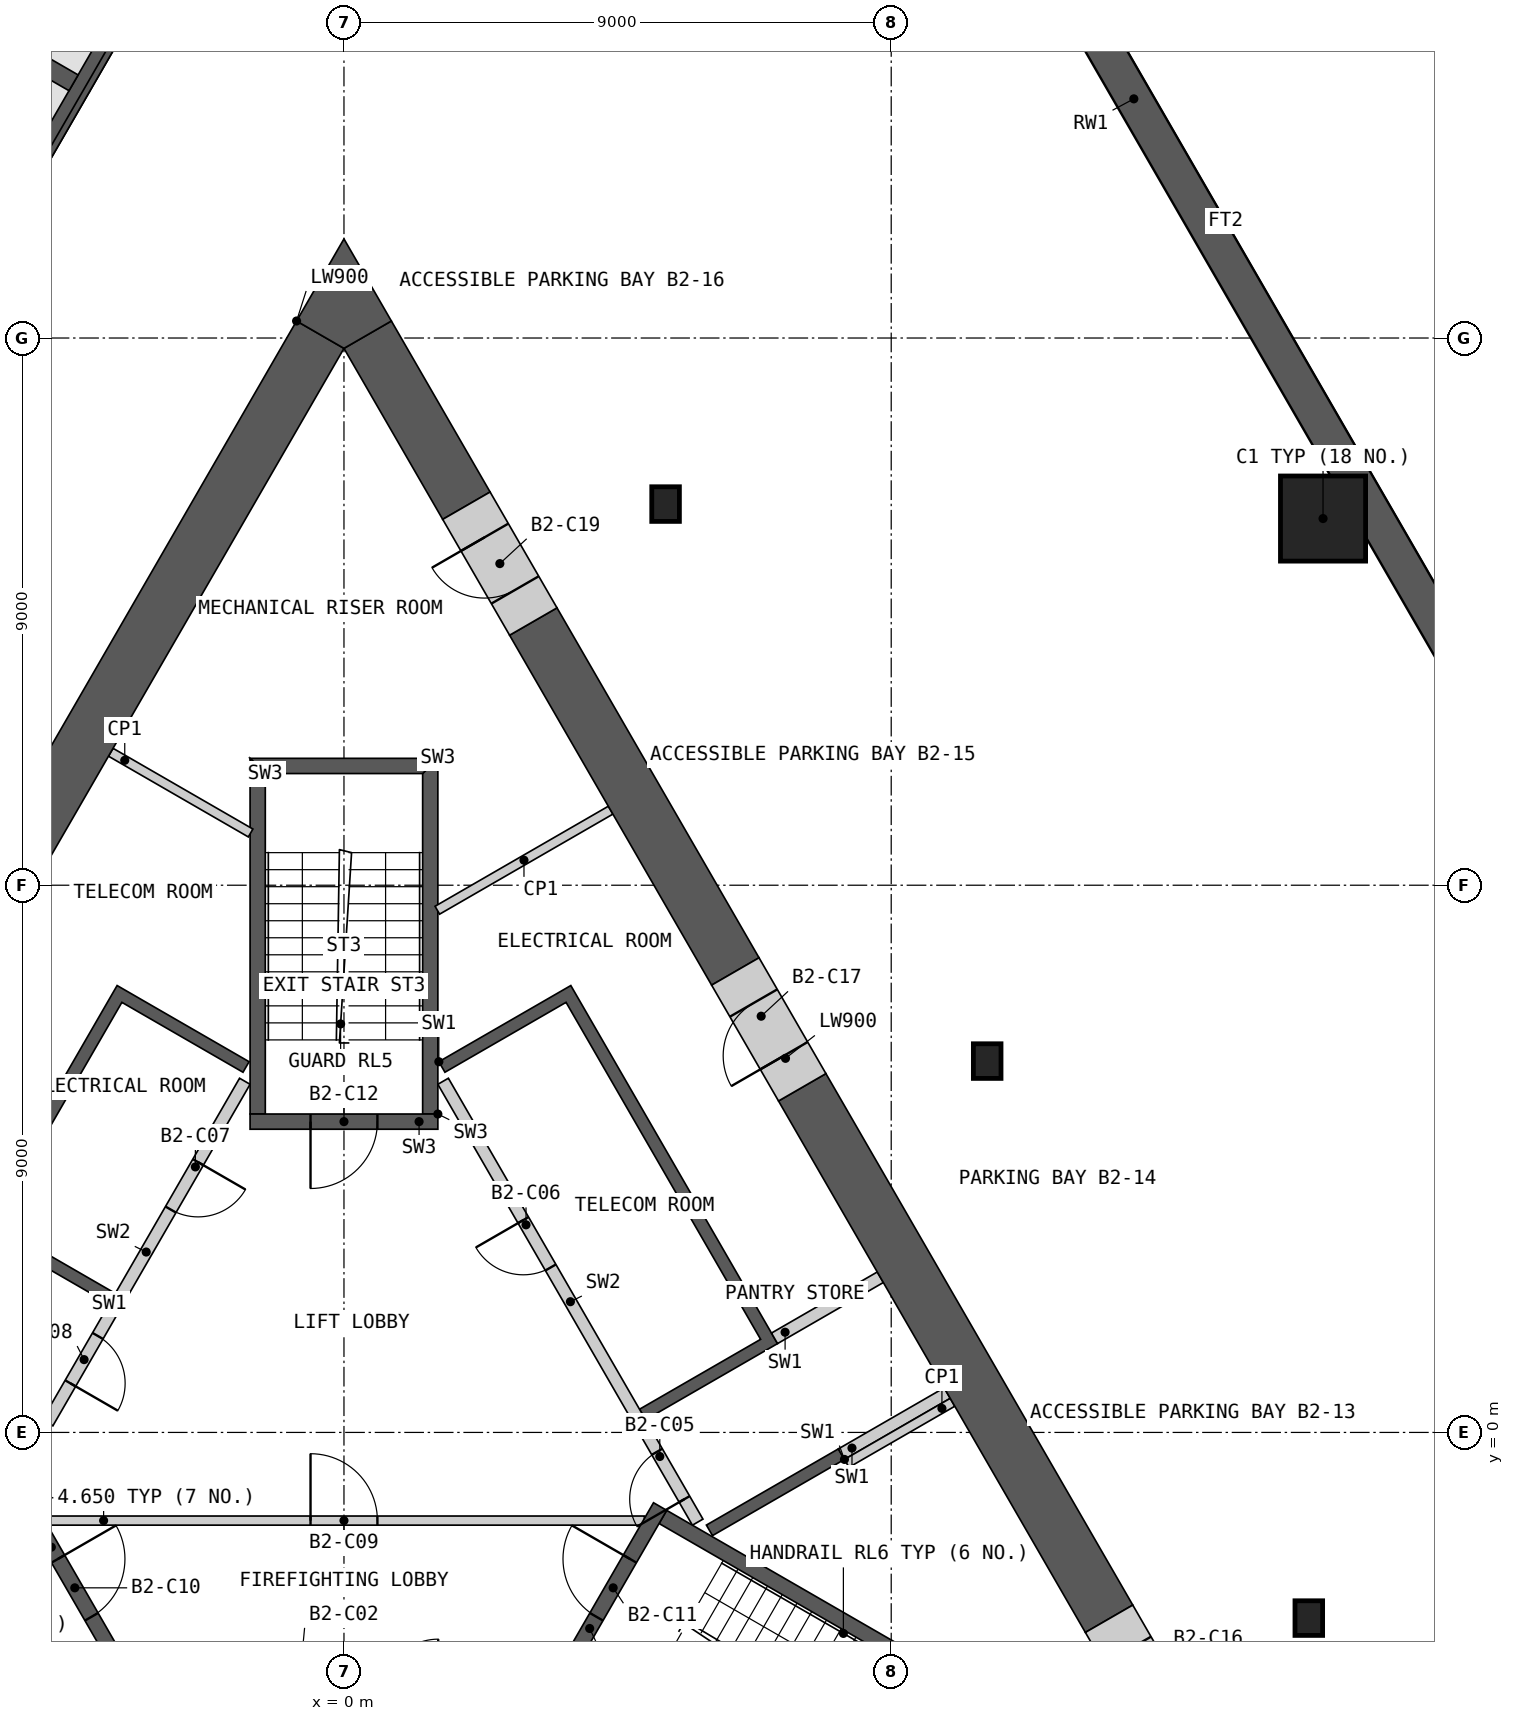
"""IFC4 building model, lengths in metres.
Left out: names, types, materials, properties, quantities, classifications, styles, units other than length and angle.
Written with IfcOpenShell. Run it as: python <this file> out.ifc"""

import sys

from ifc_helpers import new_model, si_unit, direction, frame, frame_2d, origin, origin_2d, place, context, subcontext, project, spatial, polyline, rectangle, hollow_rectangle, i_section, outline, extrude, element, fill, save


model = new_model("IFC4")
c1 = context("Model", 3, precision=1e-05, world=origin(), true_north=direction((0.0, 1.0)))
c2 = subcontext(c1, "Body", "Model", "MODEL_VIEW")
j1 = project(units=[si_unit("LENGTHUNIT", "METRE"), si_unit("PLANEANGLEUNIT", "RADIAN")], contexts=[c1])
p1 = place(None, origin())
s1 = spatial("IfcSite", under=j1, at=p1, CompositionType="ELEMENT")
p2 = place(p1, origin())
s2 = spatial("IfcBuilding", under=s1, at=p2, CompositionType="ELEMENT")
p3 = place(p2, frame((0.0, 0.0, -8.4)))
s3 = spatial("IfcBuildingStorey", under=s2, at=p3, CompositionType="ELEMENT", Elevation=-8.4)
p4 = place(p3, frame((31.74, -10.542, 0.0), z_axis=(0.0, 0.0, 1.0), x_axis=(-0.500000005698, 0.866025400495, 0.0)))
e1 = element("IfcWall", 1, at=p4, inside=s3, PredefinedType="SOLIDWALL", context=c2, shape_type="SweptSolid", body=[
    extrude(rectangle(XDim=50.0, YDim=0.6, at=frame_2d((25.0, 0.0))), origin(), (0.0, 0.0, 1.0), 3.75),
])
p5 = place(p3, frame((16.102, 15.031, 0.0), z_axis=(0.0, 0.0, 1.0), x_axis=(1.0, 0.0, 0.0)))
e2 = element("IfcColumn", 2, at=p5, inside=s3, PredefinedType="COLUMN", context=c2, shape_type="SweptSolid", body=[
    extrude(hollow_rectangle(XDim=1.4, YDim=1.4, WallThickness=0.1, at=origin_2d()), origin(), (0.0, 0.0, 1.0), 4.2),
])
for number, where, z_axis, x_axis in (
    (3, (15.868, -3.054, 0.0), (0.0, 0.0, 1.0), (1.0, 0.0, 0.0)),
    (4, (10.578, 6.107, 0.0), (0.0, 0.0, 1.0), (1.0, 0.0, 0.0)),
    (5, (5.289, 15.269, 0.0), (0.0, 0.0, 1.0), (1.0, 0.0, 0.0)),
):
    element("IfcColumn", number, at=place(p3, frame(where, z_axis=z_axis, x_axis=x_axis)), inside=s3, PredefinedType="COLUMN", context=c2, shape_type="SweptSolid", body=[
        extrude(i_section(OverallWidth=0.454, OverallDepth=0.57, WebThickness=0.078, FlangeThickness=0.125, at=origin_2d()), origin(), (0.0, 0.0, 1.0), 4.2),
    ])
p6 = place(p3, origin())
e6 = element("IfcWall", 6, at=p6, inside=s3, PredefinedType="SHEAR", context=c2, shape_type="SweptSolid", body=[
    extrude(outline(polyline([(1.561, 6.097), (3.731, 7.35), (7.131, 1.461), (4.96, 0.208), (4.861, 0.381), (6.852, 1.531), (3.652, 7.074), (1.66, 5.924), (1.561, 6.097)])), origin(), (0.0, 0.0, 1.0), 3.75),
])
p7 = place(p3, origin())
e7 = element("IfcWall", 7, at=p7, inside=s3, PredefinedType="SHEAR", context=c2, shape_type="SweptSolid", body=[
    extrude(outline(polyline([(8.231, -0.444), (6.061, -1.697), (5.96, -1.524), (8.131, -0.271), (8.231, -0.444)])), origin(), (0.0, 0.0, 1.0), 3.75),
])
p8 = place(p3, frame((5.817, -1.476, 0.0), z_axis=(0.0, 0.0, 1.0), x_axis=(-0.500002616675, 0.866023893041, 0.0)))
e8 = element("IfcWall", 8, at=p8, inside=s3, PredefinedType="SOLIDWALL", context=c2, shape_type="SweptSolid", body=[
    extrude(rectangle(XDim=8.373, YDim=0.2, at=frame_2d((4.187, 0.0))), origin(), (0.0, 0.0, 1.0), 3.75),
])
p9 = place(p8, frame((0.437, 0.0, 0.0)))
e9 = element("IfcOpeningElement", 9, at=p9, cuts=e8, PredefinedType="OPENING", context=c2, shape_type="SweptSolid", body=[
    extrude(rectangle(XDim=0.9, YDim=2.1, at=frame_2d((0.45, 1.05))), frame((0.0, 0.11, 0.0), z_axis=(0.0, -1.0, 0.0), x_axis=(1.0, 0.0, 0.0)), (0.0, 0.0, 1.0), 0.22),
])
p10 = place(p8, frame((4.837, 0.0, 0.0)))
e10 = element("IfcOpeningElement", 10, at=p10, cuts=e8, PredefinedType="OPENING", context=c2, shape_type="SweptSolid", body=[
    extrude(rectangle(XDim=0.9, YDim=2.1, at=frame_2d((0.45, 1.05))), frame((0.0, 0.11, 0.0), z_axis=(0.0, -1.0, 0.0), x_axis=(1.0, 0.0, 0.0)), (0.0, 0.0, 1.0), 0.22),
])
p11 = place(p3, frame((8.181, -0.357, 0.0), z_axis=(0.0, 0.0, 1.0), x_axis=(0.866035824272, 0.499981950752, 0.0)))
e11 = element("IfcWall", 11, at=p11, inside=s3, PredefinedType="SHEAR", context=c2, shape_type="SweptSolid", body=[
    extrude(rectangle(XDim=2.009, YDim=0.2, at=frame_2d((1.004, 0.0))), origin(), (0.0, 0.0, 1.0), 3.75),
])
p12 = place(p3, frame((7.081, 1.548, 0.0), z_axis=(0.0, 0.0, 1.0), x_axis=(0.865983199114, 0.50007309351, 0.0)))
e12 = element("IfcWall", 12, at=p12, inside=s3, PredefinedType="SHEAR", context=c2, shape_type="SweptSolid", body=[
    extrude(rectangle(XDim=2.009, YDim=0.2, at=frame_2d((1.004, 0.0))), origin(), (0.0, 0.0, 1.0), 3.75),
])
p13 = place(p3, origin())
e13 = element("IfcWall", 13, at=p13, inside=s3, PredefinedType="SHEAR", context=c2, shape_type="SweptSolid", body=[
    extrude(outline(polyline([(-3.861, 2.113), (-6.031, 3.366), (-3.731, 7.35), (-1.561, 6.097), (-1.66, 5.924), (-3.652, 7.074), (-5.752, 3.437), (-3.76, 2.287), (-3.861, 2.113)])), origin(), (0.0, 0.0, 1.0), 3.75),
])
p14 = place(p3, frame((-1.631, 5.776, 0.0), z_axis=(0.0, 0.0, 1.0), x_axis=(-0.499992876559, -0.866029516466, 0.0)))
e14 = element("IfcWall", 14, at=p14, inside=s3, PredefinedType="SOLIDWALL", context=c2, shape_type="SweptSolid", body=[
    extrude(rectangle(XDim=6.486, YDim=0.2, at=frame_2d((3.243, 0.0))), origin(), (0.0, 0.0, 1.0), 3.75),
])
p15 = place(p14, frame((1.537, 0.0, 0.0)))
e15 = element("IfcOpeningElement", 15, at=p15, cuts=e14, PredefinedType="OPENING", context=c2, shape_type="SweptSolid", body=[
    extrude(rectangle(XDim=0.9, YDim=2.1, at=frame_2d((0.45, 1.05))), frame((0.0, 0.11, 0.0), z_axis=(0.0, -1.0, 0.0), x_axis=(1.0, 0.0, 0.0)), (0.0, 0.0, 1.0), 0.22),
])
p16 = place(p14, frame((4.837, 0.0, 0.0)))
e16 = element("IfcOpeningElement", 16, at=p16, cuts=e14, PredefinedType="OPENING", context=c2, shape_type="SweptSolid", body=[
    extrude(rectangle(XDim=0.9, YDim=2.1, at=frame_2d((0.45, 1.05))), frame((0.0, 0.11, 0.0), z_axis=(0.0, -1.0, 0.0), x_axis=(1.0, 0.0, 0.0)), (0.0, 0.0, 1.0), 0.22),
])
p17 = place(p3, frame((-4.941, -1.45, 0.0), z_axis=(0.0, 0.0, 1.0), x_axis=(1.0, 0.0, 0.0)))
e17 = element("IfcWall", 17, at=p17, inside=s3, PredefinedType="PARTITIONING", context=c2, shape_type="SweptSolid", body=[
    extrude(rectangle(XDim=9.882, YDim=0.15, at=frame_2d((4.941, 0.0))), origin(), (0.0, 0.0, 1.0), 3.75),
])
p18 = place(p17, frame((4.391, 0.0, 0.0)))
e18 = element("IfcOpeningElement", 18, at=p18, cuts=e17, PredefinedType="OPENING", context=c2, shape_type="SweptSolid", body=[
    extrude(rectangle(XDim=1.1, YDim=2.1, at=frame_2d((0.55, 1.05))), frame((0.0, 0.085, 0.0), z_axis=(0.0, -1.0, 0.0), x_axis=(1.0, 0.0, 0.0)), (0.0, 0.0, 1.0), 0.17),
])
p19 = place(p3, frame((-5.199, -1.219, 0.0), z_axis=(0.0, 0.0, 1.0), x_axis=(0.499982516597, -0.866035497597, 0.0)))
e19 = element("IfcWall", 19, at=p19, inside=s3, PredefinedType="SHEAR", context=c2, shape_type="SweptSolid", body=[
    extrude(rectangle(XDim=3.088, YDim=0.25, at=frame_2d((1.544, 0.0))), origin(), (0.0, 0.0, 1.0), 3.75),
])
p20 = place(p19, frame((0.994, 0.0, 0.0)))
e20 = element("IfcOpeningElement", 20, at=p20, cuts=e19, PredefinedType="OPENING", context=c2, shape_type="SweptSolid", body=[
    extrude(rectangle(XDim=1.1, YDim=2.1, at=frame_2d((0.55, 1.05))), frame((0.0, 0.135, 0.0), z_axis=(0.0, -1.0, 0.0), x_axis=(1.0, 0.0, 0.0)), (0.0, 0.0, 1.0), 0.27),
])
p21 = place(p3, origin())
e21 = element("IfcWall", 21, at=p21, inside=s3, PredefinedType="SHEAR", context=c2, shape_type="SweptSolid", body=[
    extrude(outline(polyline([(10.032, -4.298), (10.374, -4.206), (5.307, -1.281), (5.182, -1.498), (10.032, -4.298)])), origin(), (0.0, 0.0, 1.0), 3.75),
])
p22 = place(p3, frame((3.655, -3.893, 0.0), z_axis=(0.0, 0.0, 1.0), x_axis=(0.499982516597, 0.866035497597, 0.0)))
e22 = element("IfcWall", 22, at=p22, inside=s3, PredefinedType="SHEAR", context=c2, shape_type="SweptSolid", body=[
    extrude(rectangle(XDim=3.088, YDim=0.25, at=frame_2d((1.544, 0.0))), origin(), (0.0, 0.0, 1.0), 3.75),
])
p23 = place(p22, frame((0.994, 0.0, 0.0)))
e23 = element("IfcOpeningElement", 23, at=p23, cuts=e22, PredefinedType="OPENING", context=c2, shape_type="SweptSolid", body=[
    extrude(rectangle(XDim=1.1, YDim=2.1, at=frame_2d((0.55, 1.05))), frame((0.0, 0.135, 0.0), z_axis=(0.0, -1.0, 0.0), x_axis=(1.0, 0.0, 0.0)), (0.0, 0.0, 1.0), 0.27),
])
p24 = place(p3, origin())
e24 = element("IfcWall", 24, at=p24, inside=s3, PredefinedType="SHEAR", context=c2, shape_type="SweptSolid", body=[
    extrude(outline(polyline([(1.544, 5.237), (1.544, 11.087), (1.294, 10.837), (1.294, 5.237), (1.544, 5.237)])), origin(), (0.0, 0.0, 1.0), 3.75),
])
p25 = place(p3, origin())
e25 = element("IfcWall", 25, at=p25, inside=s3, PredefinedType="SHEAR", context=c2, shape_type="SweptSolid", body=[
    extrude(outline(polyline([(1.544, 11.087), (-1.544, 11.087), (-1.294, 10.837), (1.294, 10.837), (1.544, 11.087)])), origin(), (0.0, 0.0, 1.0), 3.75),
])
p26 = place(p3, origin())
e26 = element("IfcWall", 26, at=p26, inside=s3, PredefinedType="SHEAR", context=c2, shape_type="SweptSolid", body=[
    extrude(outline(polyline([(-1.294, 10.837), (-1.544, 11.087), (-1.544, 5.237), (-1.294, 5.237), (-1.294, 10.837)])), origin(), (0.0, 0.0, 1.0), 3.75),
])
p27 = place(p3, frame((1.544, 5.112, 0.0), z_axis=(0.0, 0.0, 1.0), x_axis=(-1.0, 0.0, 0.0)))
e27 = element("IfcWall", 27, at=p27, inside=s3, PredefinedType="SHEAR", context=c2, shape_type="SweptSolid", body=[
    extrude(rectangle(XDim=3.088, YDim=0.25, at=frame_2d((1.544, 0.0))), origin(), (0.0, 0.0, 1.0), 3.75),
])
p28 = place(p27, frame((0.994, 0.0, 0.0)))
e28 = element("IfcOpeningElement", 28, at=p28, cuts=e27, PredefinedType="OPENING", context=c2, shape_type="SweptSolid", body=[
    extrude(rectangle(XDim=1.1, YDim=2.1, at=frame_2d((0.55, 1.05))), frame((0.0, 0.135, 0.0), z_axis=(0.0, -1.0, 0.0), x_axis=(1.0, 0.0, 0.0)), (0.0, 0.0, 1.0), 0.27),
])
p29 = place(p3, frame((8.268, -0.509, 0.0), z_axis=(0.0, 0.0, 1.0), x_axis=(0.866035824272, 0.499981950752, 0.0)))
e29 = element("IfcWall", 29, at=p29, inside=s3, PredefinedType="PARTITIONING", context=c2, shape_type="SweptSolid", body=[
    extrude(rectangle(XDim=2.009, YDim=0.15, at=frame_2d((1.004, 0.0))), origin(), (0.0, 0.0, 1.0), 3.75),
])
p30 = place(p3, frame((4.385, 10.234, 0.0), z_axis=(0.0, 0.0, 1.0), x_axis=(-0.866006439694, -0.50003284533, 0.0)))
e30 = element("IfcWall", 30, at=p30, inside=s3, PredefinedType="PARTITIONING", context=c2, shape_type="SweptSolid", body=[
    extrude(rectangle(XDim=3.291, YDim=0.15, at=frame_2d((1.646, 0.0))), origin(), (0.0, 0.0, 1.0), 3.75),
])
p31 = place(p3, frame((-3.835, 11.187, 0.0), z_axis=(0.0, 0.0, 1.0), x_axis=(0.866011053975, -0.500024853776, 0.0)))
e31 = element("IfcWall", 31, at=p31, inside=s3, PredefinedType="PARTITIONING", context=c2, shape_type="SweptSolid", body=[
    extrude(rectangle(XDim=2.656, YDim=0.15, at=frame_2d((1.328, 0.0))), origin(), (0.0, 0.0, 1.0), 3.75),
])
p32 = place(p3, frame((12.583, -3.065, 0.0), z_axis=(0.0, 0.0, 1.0), x_axis=(-0.499991853951, 0.866030106857, 0.0)))
e32 = element("IfcWall", 32, at=p32, inside=s3, PredefinedType="SHEAR", context=c2, shape_type="SweptSolid", body=[
    extrude(rectangle(XDim=10.094, YDim=0.9, at=frame_2d((5.047, 0.0))), origin(), (0.0, 0.0, 1.0), 3.75),
])
p33 = place(p3, frame((6.436, 7.582, 0.0), z_axis=(0.0, 0.0, 1.0), x_axis=(-0.500003364394, 0.866023461342, 0.0)))
e33 = element("IfcWall", 33, at=p33, inside=s3, PredefinedType="SHEAR", context=c2, shape_type="SweptSolid", body=[
    extrude(rectangle(XDim=6.646, YDim=0.9, at=frame_2d((3.323, 0.0))), origin(), (0.0, 0.0, 1.0), 3.75),
])
p34 = place(p3, frame((2.014, 15.242, 0.0), z_axis=(0.0, 0.0, 1.0), x_axis=(-0.500019593356, 0.866014091259, 0.0)))
e34 = element("IfcWall", 34, at=p34, inside=s3, PredefinedType="SHEAR", context=c2, shape_type="SweptSolid", body=[
    extrude(rectangle(XDim=3.248, YDim=0.9, at=frame_2d((1.624, 0.0))), origin(), (0.0, 0.0, 1.0), 3.75),
])
p35 = place(p3, frame((-0.39, 18.055, 0.0), z_axis=(0.0, 0.0, 1.0), x_axis=(-0.500001039332, -0.866024803725, 0.0)))
e35 = element("IfcWall", 35, at=p35, inside=s3, PredefinedType="SHEAR", context=c2, shape_type="SweptSolid", body=[
    extrude(rectangle(XDim=10.443, YDim=0.9, at=frame_2d((5.222, 0.0))), origin(), (0.0, 0.0, 1.0), 3.75),
])
p36 = place(p3, origin())
e36 = element("IfcWall", 36, at=p36, inside=s3, PredefinedType="SHEAR", context=c2, shape_type="SweptSolid", body=[
    extrude(outline(polyline([(-0.779, 18.28), (0.0, 19.63), (0.779, 18.28), (0.0, 17.83), (-0.779, 18.28)])), origin(), (0.0, 0.0, 1.0), 3.75),
])
p37 = place(p3, frame((13.683, -4.97, 0.0), z_axis=(0.0, 0.0, 1.0), x_axis=(-0.50002983664, 0.866008176907, 0.0)))
e37 = element("IfcWall", 37, at=p37, inside=s3, PredefinedType="SHEAR", context=c2, shape_type="SweptSolid", body=[
    extrude(rectangle(XDim=2.2, YDim=0.9, at=frame_2d((1.1, 0.0))), origin(), (0.0, 0.0, 1.0), 3.75),
])
p38 = place(p37, frame((0.6, 0.0, 0.0)))
e38 = element("IfcOpeningElement", 38, at=p38, cuts=e37, PredefinedType="OPENING", context=c2, shape_type="SweptSolid", body=[
    extrude(rectangle(XDim=1.0, YDim=2.1, at=frame_2d((0.5, 1.05))), frame((0.0, 0.46, 0.0), z_axis=(0.0, -1.0, 0.0), x_axis=(1.0, 0.0, 0.0)), (0.0, 0.0, 1.0), 0.92),
])
p39 = place(p3, frame((7.536, 5.677, 0.0), z_axis=(0.0, 0.0, 1.0), x_axis=(-0.50002983664, 0.866008176907, 0.0)))
e39 = element("IfcWall", 39, at=p39, inside=s3, PredefinedType="SHEAR", context=c2, shape_type="SweptSolid", body=[
    extrude(rectangle(XDim=2.2, YDim=0.9, at=frame_2d((1.1, 0.0))), origin(), (0.0, 0.0, 1.0), 3.75),
])
p40 = place(p39, frame((0.6, 0.0, 0.0)))
e40 = element("IfcOpeningElement", 40, at=p40, cuts=e39, PredefinedType="OPENING", context=c2, shape_type="SweptSolid", body=[
    extrude(rectangle(XDim=1.0, YDim=2.1, at=frame_2d((0.5, 1.05))), frame((0.0, 0.46, 0.0), z_axis=(0.0, -1.0, 0.0), x_axis=(1.0, 0.0, 0.0)), (0.0, 0.0, 1.0), 0.92),
])
p41 = place(p3, frame((3.114, 13.337, 0.0), z_axis=(0.0, 0.0, 1.0), x_axis=(-0.499946605688, 0.86605622881, 0.0)))
e41 = element("IfcWall", 41, at=p41, inside=s3, PredefinedType="SHEAR", context=c2, shape_type="SweptSolid", body=[
    extrude(rectangle(XDim=2.2, YDim=0.9, at=frame_2d((1.1, 0.0))), origin(), (0.0, 0.0, 1.0), 3.75),
])
p42 = place(p41, frame((0.6, 0.0, 0.0)))
e42 = element("IfcOpeningElement", 42, at=p42, cuts=e41, PredefinedType="OPENING", context=c2, shape_type="SweptSolid", body=[
    extrude(rectangle(XDim=1.0, YDim=2.1, at=frame_2d((0.5, 1.05))), frame((0.0, 0.46, 0.0), z_axis=(0.0, -1.0, 0.0), x_axis=(1.0, 0.0, 0.0)), (0.0, 0.0, 1.0), 0.92),
])
p43 = place(p3, frame((-2.817, 24.72, 0.0), z_axis=(0.0, 0.0, 1.0), x_axis=(-0.500000572924, -0.866025073006, 0.0)))
e43 = element("IfcWall", 43, at=p43, inside=s3, PredefinedType="SHEAR", context=c2, shape_type="SweptSolid", body=[
    extrude(outline(polyline([(0.0, 0.0), (22.467, 0.0), (22.467, 0.3), (3.0, 3.549), (3.0, 3.544), (0.0, 3.799), (0.0, 0.0)])), frame((0.0, 0.15, 0.0), z_axis=(0.0, -1.0, 0.0), x_axis=(1.0, 0.0, 0.0)), (0.0, 0.0, 1.0), 0.3),
])
p44 = place(p3, frame((-4.447, 22.198, 0.0), z_axis=(0.0, 0.0, 1.0), x_axis=(-0.866028230842, 0.499995103361, 0.0)))
e44 = element("IfcWall", 44, at=p44, inside=s3, PredefinedType="SHEAR", context=c2, shape_type="SweptSolid", body=[
    extrude(rectangle(XDim=5.4, YDim=0.3, at=frame_2d((2.7, 0.0))), origin(), (0.0, 0.0, 1.0), 3.544),
])
p45 = place(p9, origin())
e45 = element("IfcDoor", 45, at=p45, inside=s3, OperationType="SINGLE_SWING_LEFT", PredefinedType="DOOR", context=c2, shape_type="SweptSolid", body=[
    extrude(rectangle(XDim=0.9, YDim=2.1, at=frame_2d((0.45, 1.05))), frame((0.0, 0.025, 0.0), z_axis=(0.0, -1.0, 0.0), x_axis=(1.0, 0.0, 0.0)), (0.0, 0.0, 1.0), 0.05),
])
fill(e9, e45)
p46 = place(p10, origin())
e46 = element("IfcDoor", 46, at=p46, inside=s3, OperationType="SINGLE_SWING_RIGHT", PredefinedType="DOOR", context=c2, shape_type="SweptSolid", body=[
    extrude(rectangle(XDim=0.9, YDim=2.1, at=frame_2d((0.45, 1.05))), frame((0.0, 0.025, 0.0), z_axis=(0.0, -1.0, 0.0), x_axis=(1.0, 0.0, 0.0)), (0.0, 0.0, 1.0), 0.05),
])
fill(e10, e46)
p47 = place(p15, origin())
e47 = element("IfcDoor", 47, at=p47, inside=s3, OperationType="SINGLE_SWING_LEFT", PredefinedType="DOOR", context=c2, shape_type="SweptSolid", body=[
    extrude(rectangle(XDim=0.9, YDim=2.1, at=frame_2d((0.45, 1.05))), frame((0.0, 0.025, 0.0), z_axis=(0.0, -1.0, 0.0), x_axis=(1.0, 0.0, 0.0)), (0.0, 0.0, 1.0), 0.05),
])
fill(e15, e47)
p48 = place(p16, origin())
e48 = element("IfcDoor", 48, at=p48, inside=s3, OperationType="SINGLE_SWING_RIGHT", PredefinedType="DOOR", context=c2, shape_type="SweptSolid", body=[
    extrude(rectangle(XDim=0.9, YDim=2.1, at=frame_2d((0.45, 1.05))), frame((0.0, 0.025, 0.0), z_axis=(0.0, -1.0, 0.0), x_axis=(1.0, 0.0, 0.0)), (0.0, 0.0, 1.0), 0.05),
])
fill(e16, e48)
p49 = place(p18, origin())
e49 = element("IfcDoor", 49, at=p49, inside=s3, OperationType="SINGLE_SWING_LEFT", PredefinedType="DOOR", context=c2, shape_type="SweptSolid", body=[
    extrude(rectangle(XDim=1.1, YDim=2.1, at=frame_2d((0.55, 1.05))), frame((0.0, 0.025, 0.0), z_axis=(0.0, -1.0, 0.0), x_axis=(1.0, 0.0, 0.0)), (0.0, 0.0, 1.0), 0.05),
])
fill(e18, e49)
p50 = place(p20, origin())
e50 = element("IfcDoor", 50, at=p50, inside=s3, OperationType="SINGLE_SWING_LEFT", PredefinedType="DOOR", context=c2, shape_type="SweptSolid", body=[
    extrude(rectangle(XDim=1.1, YDim=2.1, at=frame_2d((0.55, 1.05))), frame((0.0, 0.025, 0.0), z_axis=(0.0, -1.0, 0.0), x_axis=(1.0, 0.0, 0.0)), (0.0, 0.0, 1.0), 0.05),
])
fill(e20, e50)
p51 = place(p23, origin())
e51 = element("IfcDoor", 51, at=p51, inside=s3, OperationType="SINGLE_SWING_RIGHT", PredefinedType="DOOR", context=c2, shape_type="SweptSolid", body=[
    extrude(rectangle(XDim=1.1, YDim=2.1, at=frame_2d((0.55, 1.05))), frame((0.0, 0.025, 0.0), z_axis=(0.0, -1.0, 0.0), x_axis=(1.0, 0.0, 0.0)), (0.0, 0.0, 1.0), 0.05),
])
fill(e23, e51)
p52 = place(p28, origin())
e52 = element("IfcDoor", 52, at=p52, inside=s3, OperationType="SINGLE_SWING_RIGHT", PredefinedType="DOOR", context=c2, shape_type="SweptSolid", body=[
    extrude(rectangle(XDim=1.1, YDim=2.1, at=frame_2d((0.55, 1.05))), frame((0.0, 0.025, 0.0), z_axis=(0.0, -1.0, 0.0), x_axis=(1.0, 0.0, 0.0)), (0.0, 0.0, 1.0), 0.05),
])
fill(e28, e52)
p53 = place(p40, origin())
e53 = element("IfcDoor", 53, at=p53, inside=s3, OperationType="SINGLE_SWING_LEFT", PredefinedType="DOOR", context=c2, shape_type="SweptSolid", body=[
    extrude(rectangle(XDim=1.0, YDim=2.1, at=frame_2d((0.5, 1.05))), frame((0.0, 0.205, 0.0), z_axis=(0.0, -1.0, 0.0), x_axis=(1.0, 0.0, 0.0)), (0.0, 0.0, 1.0), 0.05),
])
fill(e40, e53)
p54 = place(p42, origin())
e54 = element("IfcDoor", 54, at=p54, inside=s3, OperationType="SINGLE_SWING_RIGHT", PredefinedType="DOOR", context=c2, shape_type="SweptSolid", body=[
    extrude(rectangle(XDim=1.0, YDim=2.1, at=frame_2d((0.5, 1.05))), frame((0.0, 0.205, 0.0), z_axis=(0.0, -1.0, 0.0), x_axis=(1.0, 0.0, 0.0)), (0.0, 0.0, 1.0), 0.05),
])
fill(e42, e54)
save(model, sys.argv[1])
